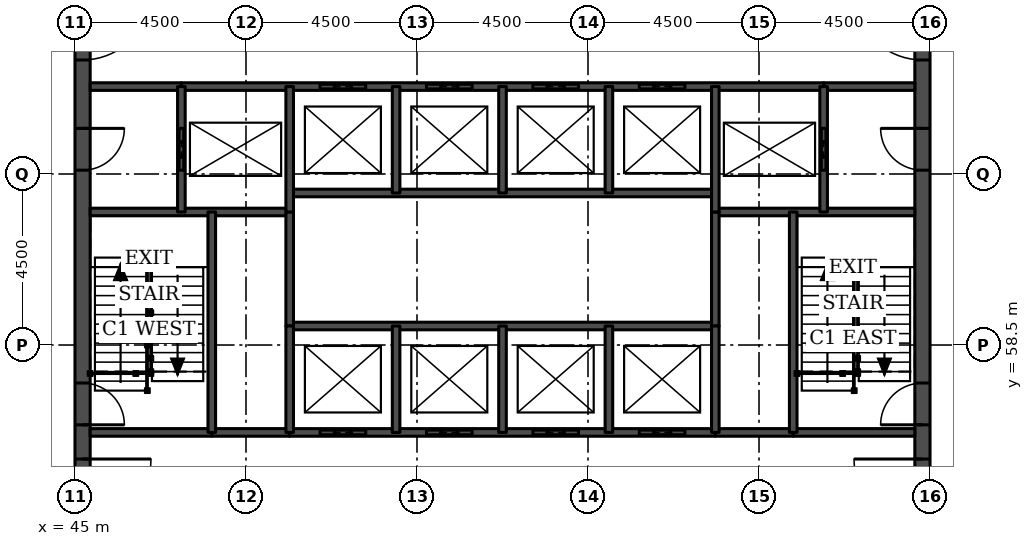
"""IFC4 building model, lengths in metres.
Left out: names, types, materials, properties, quantities, classifications, styles, units other than length and angle.
Written with IfcOpenShell. Run it as: python <this file> out.ifc"""

import sys

from ifc_helpers import new_model, si_unit, direction, frame, frame_2d, origin, place, context, subcontext, project, spatial, rectangle, extrude, element, fill, save


model = new_model("IFC4")
c1 = context("Model", 3, precision=1e-05, world=origin(), true_north=direction((0.0, 1.0)))
c2 = subcontext(c1, "Body", "Model", "MODEL_VIEW")
j1 = project(units=[si_unit("LENGTHUNIT", "METRE"), si_unit("PLANEANGLEUNIT", "RADIAN")], contexts=[c1])
p1 = place(None, origin())
s1 = spatial("IfcSite", under=j1, at=p1, CompositionType="ELEMENT")
p2 = place(p1, origin())
s2 = spatial("IfcBuilding", under=s1, at=p2, CompositionType="ELEMENT")
p3 = place(p2, frame((0.0, 0.0, 181.0)))
s3 = spatial("IfcBuildingStorey", under=s2, at=p3, CompositionType="ELEMENT", Elevation=181.0)
p4 = place(p3, frame((45.2, 49.5, 0.0), z_axis=(0.0, 0.0, 1.0), x_axis=(0.0, 1.0, 0.0)))
e1 = element("IfcWall", 1, at=p4, inside=s3, PredefinedType="SHEAR", context=c2, shape_type="SweptSolid", body=[
    extrude(rectangle(XDim=22.5, YDim=0.4, at=frame_2d((11.25, 0.0))), origin(), (0.0, 0.0, 1.0), 3.7),
])
p5 = place(p4, frame((4.2, 0.0, 0.0)))
e2 = element("IfcOpeningElement", 2, at=p5, cuts=e1, PredefinedType="OPENING", context=c2, shape_type="SweptSolid", body=[
    extrude(rectangle(XDim=1.8, YDim=2.1, at=frame_2d((0.9, 1.05))), frame((0.0, 0.21, 0.0), z_axis=(0.0, -1.0, 0.0), x_axis=(1.0, 0.0, 0.0)), (0.0, 0.0, 1.0), 0.42),
])
p6 = place(p4, frame((6.9, 0.0, 0.0)))
e3 = element("IfcOpeningElement", 3, at=p6, cuts=e1, PredefinedType="OPENING", context=c2, shape_type="SweptSolid", body=[
    extrude(rectangle(XDim=1.1, YDim=2.1, at=frame_2d((0.55, 1.05))), frame((0.0, 0.21, 0.0), z_axis=(0.0, -1.0, 0.0), x_axis=(1.0, 0.0, 0.0)), (0.0, 0.0, 1.0), 0.42),
])
p7 = place(p4, frame((13.6, 0.0, 0.0)))
e4 = element("IfcOpeningElement", 4, at=p7, cuts=e1, PredefinedType="OPENING", context=c2, shape_type="SweptSolid", body=[
    extrude(rectangle(XDim=1.1, YDim=2.1, at=frame_2d((0.55, 1.05))), frame((0.0, 0.21, 0.0), z_axis=(0.0, -1.0, 0.0), x_axis=(1.0, 0.0, 0.0)), (0.0, 0.0, 1.0), 0.42),
])
p8 = place(p4, frame((16.5, 0.0, 0.0)))
e5 = element("IfcOpeningElement", 5, at=p8, cuts=e1, PredefinedType="OPENING", context=c2, shape_type="SweptSolid", body=[
    extrude(rectangle(XDim=1.8, YDim=2.1, at=frame_2d((0.9, 1.05))), frame((0.0, 0.21, 0.0), z_axis=(0.0, -1.0, 0.0), x_axis=(1.0, 0.0, 0.0)), (0.0, 0.0, 1.0), 0.42),
])
p9 = place(p3, frame((67.3, 49.5, 0.0), z_axis=(0.0, 0.0, 1.0), x_axis=(0.0, 1.0, 0.0)))
e6 = element("IfcWall", 6, at=p9, inside=s3, PredefinedType="SHEAR", context=c2, shape_type="SweptSolid", body=[
    extrude(rectangle(XDim=22.5, YDim=0.4, at=frame_2d((11.25, 0.0))), origin(), (0.0, 0.0, 1.0), 3.7),
])
p10 = place(p9, frame((4.2, 0.0, 0.0)))
e7 = element("IfcOpeningElement", 7, at=p10, cuts=e6, PredefinedType="OPENING", context=c2, shape_type="SweptSolid", body=[
    extrude(rectangle(XDim=1.8, YDim=2.1, at=frame_2d((0.9, 1.05))), frame((0.0, 0.21, 0.0), z_axis=(0.0, -1.0, 0.0), x_axis=(1.0, 0.0, 0.0)), (0.0, 0.0, 1.0), 0.42),
])
p11 = place(p9, frame((6.9, 0.0, 0.0)))
e8 = element("IfcOpeningElement", 8, at=p11, cuts=e6, PredefinedType="OPENING", context=c2, shape_type="SweptSolid", body=[
    extrude(rectangle(XDim=1.1, YDim=2.1, at=frame_2d((0.55, 1.05))), frame((0.0, 0.21, 0.0), z_axis=(0.0, -1.0, 0.0), x_axis=(1.0, 0.0, 0.0)), (0.0, 0.0, 1.0), 0.42),
])
p12 = place(p9, frame((13.6, 0.0, 0.0)))
e9 = element("IfcOpeningElement", 9, at=p12, cuts=e6, PredefinedType="OPENING", context=c2, shape_type="SweptSolid", body=[
    extrude(rectangle(XDim=1.1, YDim=2.1, at=frame_2d((0.55, 1.05))), frame((0.0, 0.21, 0.0), z_axis=(0.0, -1.0, 0.0), x_axis=(1.0, 0.0, 0.0)), (0.0, 0.0, 1.0), 0.42),
])
p13 = place(p9, frame((16.5, 0.0, 0.0)))
e10 = element("IfcOpeningElement", 10, at=p13, cuts=e6, PredefinedType="OPENING", context=c2, shape_type="SweptSolid", body=[
    extrude(rectangle(XDim=1.8, YDim=2.1, at=frame_2d((0.9, 1.05))), frame((0.0, 0.21, 0.0), z_axis=(0.0, -1.0, 0.0), x_axis=(1.0, 0.0, 0.0)), (0.0, 0.0, 1.0), 0.42),
])
for number, where, z_axis, x_axis in (
    (11, (48.6, 56.2, 0.0), (0.0, 0.0, 1.0), (1.0, 0.0, 0.0)),
    (12, (61.85, 56.2, 0.0), (0.0, 0.0, 1.0), (1.0, 0.0, 0.0)),
):
    element("IfcWall", number, at=place(p3, frame(where, z_axis=z_axis, x_axis=x_axis)), inside=s3, PredefinedType="SOLIDWALL", context=c2, shape_type="SweptSolid", body=[
        extrude(rectangle(XDim=2.05, YDim=0.2, at=frame_2d((1.025, 0.0))), origin(), (0.0, 0.0, 1.0), 3.55),
    ])
p14 = place(p3, frame((45.4, 56.2, 0.0), z_axis=(0.0, 0.0, 1.0), x_axis=(1.0, 0.0, 0.0)))
e13 = element("IfcWall", 13, at=p14, inside=s3, PredefinedType="SOLIDWALL", context=c2, shape_type="SweptSolid", body=[
    extrude(rectangle(XDim=3.2, YDim=0.2, at=frame_2d((1.6, 0.0))), origin(), (0.0, 0.0, 1.0), 3.55),
])
p15 = place(p3, frame((50.65, 56.2, 0.0), z_axis=(0.0, 0.0, 1.0), x_axis=(1.0, 0.0, 0.0)))
e14 = element("IfcWall", 14, at=p15, inside=s3, PredefinedType="SOLIDWALL", context=c2, shape_type="SweptSolid", body=[
    extrude(rectangle(XDim=11.2, YDim=0.2, at=frame_2d((5.6, 0.0))), origin(), (0.0, 0.0, 1.0), 3.55),
])
p16 = place(p15, frame((0.8, 0.0, 0.0)))
e15 = element("IfcOpeningElement", 15, at=p16, cuts=e14, PredefinedType="OPENING", context=c2, shape_type="SweptSolid", body=[
    extrude(rectangle(XDim=1.2, YDim=2.1, at=frame_2d((0.6, 1.05))), frame((0.0, 0.11, 0.0), z_axis=(0.0, -1.0, 0.0), x_axis=(1.0, 0.0, 0.0)), (0.0, 0.0, 1.0), 0.22),
])
p17 = place(p15, frame((3.6, 0.0, 0.0)))
e16 = element("IfcOpeningElement", 16, at=p17, cuts=e14, PredefinedType="OPENING", context=c2, shape_type="SweptSolid", body=[
    extrude(rectangle(XDim=1.2, YDim=2.1, at=frame_2d((0.6, 1.05))), frame((0.0, 0.11, 0.0), z_axis=(0.0, -1.0, 0.0), x_axis=(1.0, 0.0, 0.0)), (0.0, 0.0, 1.0), 0.22),
])
p18 = place(p15, frame((6.4, 0.0, 0.0)))
e17 = element("IfcOpeningElement", 17, at=p18, cuts=e14, PredefinedType="OPENING", context=c2, shape_type="SweptSolid", body=[
    extrude(rectangle(XDim=1.2, YDim=2.1, at=frame_2d((0.6, 1.05))), frame((0.0, 0.11, 0.0), z_axis=(0.0, -1.0, 0.0), x_axis=(1.0, 0.0, 0.0)), (0.0, 0.0, 1.0), 0.22),
])
p19 = place(p15, frame((9.2, 0.0, 0.0)))
e18 = element("IfcOpeningElement", 18, at=p19, cuts=e14, PredefinedType="OPENING", context=c2, shape_type="SweptSolid", body=[
    extrude(rectangle(XDim=1.2, YDim=2.1, at=frame_2d((0.6, 1.05))), frame((0.0, 0.11, 0.0), z_axis=(0.0, -1.0, 0.0), x_axis=(1.0, 0.0, 0.0)), (0.0, 0.0, 1.0), 0.22),
])
p20 = place(p3, frame((63.9, 56.2, 0.0), z_axis=(0.0, 0.0, 1.0), x_axis=(1.0, 0.0, 0.0)))
e19 = element("IfcWall", 19, at=p20, inside=s3, PredefinedType="SOLIDWALL", context=c2, shape_type="SweptSolid", body=[
    extrude(rectangle(XDim=3.2, YDim=0.2, at=frame_2d((1.6, 0.0))), origin(), (0.0, 0.0, 1.0), 3.55),
])
p21 = place(p3, frame((50.65, 59.0, 0.0), z_axis=(0.0, 0.0, 1.0), x_axis=(1.0, 0.0, 0.0)))
e20 = element("IfcWall", 20, at=p21, inside=s3, PredefinedType="SOLIDWALL", context=c2, shape_type="SweptSolid", body=[
    extrude(rectangle(XDim=11.2, YDim=0.2, at=frame_2d((5.6, 0.0))), origin(), (0.0, 0.0, 1.0), 3.7),
])
for number, where, z_axis, x_axis in (
    (21, (45.4, 62.0, 0.0), (0.0, 0.0, 1.0), (1.0, 0.0, 0.0)),
    (22, (61.85, 62.0, 0.0), (0.0, 0.0, 1.0), (1.0, 0.0, 0.0)),
):
    element("IfcWall", number, at=place(p3, frame(where, z_axis=z_axis, x_axis=x_axis)), inside=s3, PredefinedType="SOLIDWALL", context=c2, shape_type="SweptSolid", body=[
        extrude(rectangle(XDim=5.25, YDim=0.2, at=frame_2d((2.625, 0.0))), origin(), (0.0, 0.0, 1.0), 3.55),
    ])
p22 = place(p3, frame((50.65, 62.5, 0.0), z_axis=(0.0, 0.0, 1.0), x_axis=(1.0, 0.0, 0.0)))
e23 = element("IfcWall", 23, at=p22, inside=s3, PredefinedType="SOLIDWALL", context=c2, shape_type="SweptSolid", body=[
    extrude(rectangle(XDim=11.2, YDim=0.2, at=frame_2d((5.6, 0.0))), origin(), (0.0, 0.0, 1.0), 3.7),
])
for number, where, z_axis, x_axis in (
    (24, (45.4, 65.3, 0.0), (0.0, 0.0, 1.0), (1.0, 0.0, 0.0)),
    (25, (64.7, 65.3, 0.0), (0.0, 0.0, 1.0), (1.0, 0.0, 0.0)),
):
    element("IfcWall", number, at=place(p3, frame(where, z_axis=z_axis, x_axis=x_axis)), inside=s3, PredefinedType="SOLIDWALL", context=c2, shape_type="SweptSolid", body=[
        extrude(rectangle(XDim=2.4, YDim=0.2, at=frame_2d((1.2, 0.0))), origin(), (0.0, 0.0, 1.0), 3.55),
    ])
p23 = place(p3, frame((47.8, 65.3, 0.0), z_axis=(0.0, 0.0, 1.0), x_axis=(1.0, 0.0, 0.0)))
e26 = element("IfcWall", 26, at=p23, inside=s3, PredefinedType="SOLIDWALL", context=c2, shape_type="SweptSolid", body=[
    extrude(rectangle(XDim=16.9, YDim=0.2, at=frame_2d((8.45, 0.0))), origin(), (0.0, 0.0, 1.0), 3.55),
])
p24 = place(p23, frame((3.65, 0.0, 0.0)))
e27 = element("IfcOpeningElement", 27, at=p24, cuts=e26, PredefinedType="OPENING", context=c2, shape_type="SweptSolid", body=[
    extrude(rectangle(XDim=1.2, YDim=2.1, at=frame_2d((0.6, 1.05))), frame((0.0, 0.11, 0.0), z_axis=(0.0, -1.0, 0.0), x_axis=(1.0, 0.0, 0.0)), (0.0, 0.0, 1.0), 0.22),
])
p25 = place(p23, frame((6.45, 0.0, 0.0)))
e28 = element("IfcOpeningElement", 28, at=p25, cuts=e26, PredefinedType="OPENING", context=c2, shape_type="SweptSolid", body=[
    extrude(rectangle(XDim=1.2, YDim=2.1, at=frame_2d((0.6, 1.05))), frame((0.0, 0.11, 0.0), z_axis=(0.0, -1.0, 0.0), x_axis=(1.0, 0.0, 0.0)), (0.0, 0.0, 1.0), 0.22),
])
p26 = place(p23, frame((9.25, 0.0, 0.0)))
e29 = element("IfcOpeningElement", 29, at=p26, cuts=e26, PredefinedType="OPENING", context=c2, shape_type="SweptSolid", body=[
    extrude(rectangle(XDim=1.2, YDim=2.1, at=frame_2d((0.6, 1.05))), frame((0.0, 0.11, 0.0), z_axis=(0.0, -1.0, 0.0), x_axis=(1.0, 0.0, 0.0)), (0.0, 0.0, 1.0), 0.22),
])
p27 = place(p23, frame((12.05, 0.0, 0.0)))
e30 = element("IfcOpeningElement", 30, at=p27, cuts=e26, PredefinedType="OPENING", context=c2, shape_type="SweptSolid", body=[
    extrude(rectangle(XDim=1.2, YDim=2.1, at=frame_2d((0.6, 1.05))), frame((0.0, 0.11, 0.0), z_axis=(0.0, -1.0, 0.0), x_axis=(1.0, 0.0, 0.0)), (0.0, 0.0, 1.0), 0.22),
])
p28 = place(p3, frame((47.8, 62.0, 0.0), z_axis=(0.0, 0.0, 1.0), x_axis=(0.0, 1.0, 0.0)))
e31 = element("IfcWall", 31, at=p28, inside=s3, PredefinedType="SOLIDWALL", context=c2, shape_type="SweptSolid", body=[
    extrude(rectangle(XDim=3.3, YDim=0.2, at=frame_2d((1.65, 0.0))), origin(), (0.0, 0.0, 1.0), 3.55),
])
p29 = place(p28, frame((1.1, 0.0, 0.0)))
e32 = element("IfcOpeningElement", 32, at=p29, cuts=e31, PredefinedType="OPENING", context=c2, shape_type="SweptSolid", body=[
    extrude(rectangle(XDim=1.1, YDim=2.1, at=frame_2d((0.55, 1.05))), frame((0.0, 0.11, 0.0), z_axis=(0.0, -1.0, 0.0), x_axis=(1.0, 0.0, 0.0)), (0.0, 0.0, 1.0), 0.22),
])
p30 = place(p3, frame((48.6, 56.2, 0.0), z_axis=(0.0, 0.0, 1.0), x_axis=(0.0, 1.0, 0.0)))
e33 = element("IfcWall", 33, at=p30, inside=s3, PredefinedType="SOLIDWALL", context=c2, shape_type="SweptSolid", body=[
    extrude(rectangle(XDim=5.8, YDim=0.2, at=frame_2d((2.9, 0.0))), origin(), (0.0, 0.0, 1.0), 3.55),
])
p31 = place(p3, frame((50.65, 59.0, 0.0), z_axis=(0.0, 0.0, 1.0), x_axis=(0.0, 1.0, 0.0)))
e34 = element("IfcWall", 34, at=p31, inside=s3, PredefinedType="SOLIDWALL", context=c2, shape_type="SweptSolid", body=[
    extrude(rectangle(XDim=3.0, YDim=0.2, at=frame_2d((1.5, 0.0))), origin(), (0.0, 0.0, 1.0), 3.7),
])
p32 = place(p3, frame((50.65, 56.2, 0.0), z_axis=(0.0, 0.0, 1.0), x_axis=(0.0, 1.0, 0.0)))
e35 = element("IfcWall", 35, at=p32, inside=s3, PredefinedType="SOLIDWALL", context=c2, shape_type="SweptSolid", body=[
    extrude(rectangle(XDim=2.8, YDim=0.2, at=frame_2d((1.4, 0.0))), origin(), (0.0, 0.0, 1.0), 3.55),
])
p33 = place(p3, frame((50.65, 62.0, 0.0), z_axis=(0.0, 0.0, 1.0), x_axis=(0.0, 1.0, 0.0)))
e36 = element("IfcWall", 36, at=p33, inside=s3, PredefinedType="SOLIDWALL", context=c2, shape_type="SweptSolid", body=[
    extrude(rectangle(XDim=3.3, YDim=0.2, at=frame_2d((1.65, 0.0))), origin(), (0.0, 0.0, 1.0), 3.55),
])
for number, where, z_axis, x_axis in (
    (37, (53.45, 56.2, 0.0), (0.0, 0.0, 1.0), (0.0, 1.0, 0.0)),
    (38, (53.45, 62.5, 0.0), (0.0, 0.0, 1.0), (0.0, 1.0, 0.0)),
    (39, (56.25, 56.2, 0.0), (0.0, 0.0, 1.0), (0.0, 1.0, 0.0)),
    (40, (56.25, 62.5, 0.0), (0.0, 0.0, 1.0), (0.0, 1.0, 0.0)),
    (41, (59.05, 56.2, 0.0), (0.0, 0.0, 1.0), (0.0, 1.0, 0.0)),
    (42, (59.05, 62.5, 0.0), (0.0, 0.0, 1.0), (0.0, 1.0, 0.0)),
):
    element("IfcWall", number, at=place(p3, frame(where, z_axis=z_axis, x_axis=x_axis)), inside=s3, PredefinedType="SOLIDWALL", context=c2, shape_type="SweptSolid", body=[
        extrude(rectangle(XDim=2.8, YDim=0.2, at=frame_2d((1.4, 0.0))), origin(), (0.0, 0.0, 1.0), 3.55),
    ])
p34 = place(p3, frame((61.85, 59.0, 0.0), z_axis=(0.0, 0.0, 1.0), x_axis=(0.0, 1.0, 0.0)))
e43 = element("IfcWall", 43, at=p34, inside=s3, PredefinedType="SOLIDWALL", context=c2, shape_type="SweptSolid", body=[
    extrude(rectangle(XDim=3.0, YDim=0.2, at=frame_2d((1.5, 0.0))), origin(), (0.0, 0.0, 1.0), 3.7),
])
p35 = place(p3, frame((61.85, 56.2, 0.0), z_axis=(0.0, 0.0, 1.0), x_axis=(0.0, 1.0, 0.0)))
e44 = element("IfcWall", 44, at=p35, inside=s3, PredefinedType="SOLIDWALL", context=c2, shape_type="SweptSolid", body=[
    extrude(rectangle(XDim=2.8, YDim=0.2, at=frame_2d((1.4, 0.0))), origin(), (0.0, 0.0, 1.0), 3.55),
])
p36 = place(p3, frame((61.85, 62.0, 0.0), z_axis=(0.0, 0.0, 1.0), x_axis=(0.0, 1.0, 0.0)))
e45 = element("IfcWall", 45, at=p36, inside=s3, PredefinedType="SOLIDWALL", context=c2, shape_type="SweptSolid", body=[
    extrude(rectangle(XDim=3.3, YDim=0.2, at=frame_2d((1.65, 0.0))), origin(), (0.0, 0.0, 1.0), 3.55),
])
p37 = place(p3, frame((63.9, 56.2, 0.0), z_axis=(0.0, 0.0, 1.0), x_axis=(0.0, 1.0, 0.0)))
e46 = element("IfcWall", 46, at=p37, inside=s3, PredefinedType="SOLIDWALL", context=c2, shape_type="SweptSolid", body=[
    extrude(rectangle(XDim=5.8, YDim=0.2, at=frame_2d((2.9, 0.0))), origin(), (0.0, 0.0, 1.0), 3.55),
])
p38 = place(p3, frame((64.7, 62.0, 0.0), z_axis=(0.0, 0.0, 1.0), x_axis=(0.0, 1.0, 0.0)))
e47 = element("IfcWall", 47, at=p38, inside=s3, PredefinedType="SOLIDWALL", context=c2, shape_type="SweptSolid", body=[
    extrude(rectangle(XDim=3.3, YDim=0.2, at=frame_2d((1.65, 0.0))), origin(), (0.0, 0.0, 1.0), 3.55),
])
p39 = place(p38, frame((1.1, 0.0, 0.0)))
e48 = element("IfcOpeningElement", 48, at=p39, cuts=e47, PredefinedType="OPENING", context=c2, shape_type="SweptSolid", body=[
    extrude(rectangle(XDim=1.1, YDim=2.1, at=frame_2d((0.55, 1.05))), frame((0.0, 0.11, 0.0), z_axis=(0.0, -1.0, 0.0), x_axis=(1.0, 0.0, 0.0)), (0.0, 0.0, 1.0), 0.22),
])
p40 = place(p16, origin())
e49 = element("IfcDoor", 49, at=p40, inside=s3, OperationType="DOUBLE_DOOR_SLIDING", PredefinedType="DOOR", context=c2, shape_type="SweptSolid", body=[
    extrude(rectangle(XDim=1.2, YDim=2.1, at=frame_2d((0.6, 1.05))), frame((0.0, 0.025, 0.0), z_axis=(0.0, -1.0, 0.0), x_axis=(1.0, 0.0, 0.0)), (0.0, 0.0, 1.0), 0.05),
])
fill(e15, e49)
p41 = place(p17, origin())
e50 = element("IfcDoor", 50, at=p41, inside=s3, OperationType="DOUBLE_DOOR_SLIDING", PredefinedType="DOOR", context=c2, shape_type="SweptSolid", body=[
    extrude(rectangle(XDim=1.2, YDim=2.1, at=frame_2d((0.6, 1.05))), frame((0.0, 0.025, 0.0), z_axis=(0.0, -1.0, 0.0), x_axis=(1.0, 0.0, 0.0)), (0.0, 0.0, 1.0), 0.05),
])
fill(e16, e50)
p42 = place(p18, origin())
e51 = element("IfcDoor", 51, at=p42, inside=s3, OperationType="DOUBLE_DOOR_SLIDING", PredefinedType="DOOR", context=c2, shape_type="SweptSolid", body=[
    extrude(rectangle(XDim=1.2, YDim=2.1, at=frame_2d((0.6, 1.05))), frame((0.0, 0.025, 0.0), z_axis=(0.0, -1.0, 0.0), x_axis=(1.0, 0.0, 0.0)), (0.0, 0.0, 1.0), 0.05),
])
fill(e17, e51)
p43 = place(p19, origin())
e52 = element("IfcDoor", 52, at=p43, inside=s3, OperationType="DOUBLE_DOOR_SLIDING", PredefinedType="DOOR", context=c2, shape_type="SweptSolid", body=[
    extrude(rectangle(XDim=1.2, YDim=2.1, at=frame_2d((0.6, 1.05))), frame((0.0, 0.025, 0.0), z_axis=(0.0, -1.0, 0.0), x_axis=(1.0, 0.0, 0.0)), (0.0, 0.0, 1.0), 0.05),
])
fill(e18, e52)
p44 = place(p24, origin())
e53 = element("IfcDoor", 53, at=p44, inside=s3, OperationType="DOUBLE_DOOR_SLIDING", PredefinedType="DOOR", context=c2, shape_type="SweptSolid", body=[
    extrude(rectangle(XDim=1.2, YDim=2.1, at=frame_2d((0.6, 1.05))), frame((0.0, 0.025, 0.0), z_axis=(0.0, -1.0, 0.0), x_axis=(1.0, 0.0, 0.0)), (0.0, 0.0, 1.0), 0.05),
])
fill(e27, e53)
p45 = place(p25, origin())
e54 = element("IfcDoor", 54, at=p45, inside=s3, OperationType="DOUBLE_DOOR_SLIDING", PredefinedType="DOOR", context=c2, shape_type="SweptSolid", body=[
    extrude(rectangle(XDim=1.2, YDim=2.1, at=frame_2d((0.6, 1.05))), frame((0.0, 0.025, 0.0), z_axis=(0.0, -1.0, 0.0), x_axis=(1.0, 0.0, 0.0)), (0.0, 0.0, 1.0), 0.05),
])
fill(e28, e54)
p46 = place(p26, origin())
e55 = element("IfcDoor", 55, at=p46, inside=s3, OperationType="DOUBLE_DOOR_SLIDING", PredefinedType="DOOR", context=c2, shape_type="SweptSolid", body=[
    extrude(rectangle(XDim=1.2, YDim=2.1, at=frame_2d((0.6, 1.05))), frame((0.0, 0.025, 0.0), z_axis=(0.0, -1.0, 0.0), x_axis=(1.0, 0.0, 0.0)), (0.0, 0.0, 1.0), 0.05),
])
fill(e29, e55)
p47 = place(p27, origin())
e56 = element("IfcDoor", 56, at=p47, inside=s3, OperationType="DOUBLE_DOOR_SLIDING", PredefinedType="DOOR", context=c2, shape_type="SweptSolid", body=[
    extrude(rectangle(XDim=1.2, YDim=2.1, at=frame_2d((0.6, 1.05))), frame((0.0, 0.025, 0.0), z_axis=(0.0, -1.0, 0.0), x_axis=(1.0, 0.0, 0.0)), (0.0, 0.0, 1.0), 0.05),
])
fill(e30, e56)
p48 = place(p29, origin())
e57 = element("IfcDoor", 57, at=p48, inside=s3, OperationType="DOUBLE_DOOR_SLIDING", PredefinedType="DOOR", context=c2, shape_type="SweptSolid", body=[
    extrude(rectangle(XDim=1.1, YDim=2.1, at=frame_2d((0.55, 1.05))), frame((0.0, 0.025, 0.0), z_axis=(0.0, -1.0, 0.0), x_axis=(1.0, 0.0, 0.0)), (0.0, 0.0, 1.0), 0.05),
])
fill(e32, e57)
p49 = place(p39, origin())
e58 = element("IfcDoor", 58, at=p49, inside=s3, OperationType="DOUBLE_DOOR_SLIDING", PredefinedType="DOOR", context=c2, shape_type="SweptSolid", body=[
    extrude(rectangle(XDim=1.1, YDim=2.1, at=frame_2d((0.55, 1.05))), frame((0.0, 0.025, 0.0), z_axis=(0.0, -1.0, 0.0), x_axis=(1.0, 0.0, 0.0)), (0.0, 0.0, 1.0), 0.05),
])
fill(e48, e58)
p50 = place(p5, frame((1.8, 0.0, 0.0), z_axis=(0.0, 0.0, 1.0), x_axis=(-1.0, 0.0, 0.0)))
e59 = element("IfcDoor", 59, at=p50, inside=s3, OperationType="SINGLE_SWING_LEFT", PredefinedType="DOOR", context=c2, shape_type="SweptSolid", body=[
    extrude(rectangle(XDim=1.8, YDim=2.1, at=frame_2d((0.9, 1.05))), frame((0.0, 0.025, 0.0), z_axis=(0.0, -1.0, 0.0), x_axis=(1.0, 0.0, 0.0)), (0.0, 0.0, 1.0), 0.05),
])
fill(e2, e59)
p51 = place(p6, frame((1.1, 0.0, 0.0), z_axis=(0.0, 0.0, 1.0), x_axis=(-1.0, 0.0, 0.0)))
e60 = element("IfcDoor", 60, at=p51, inside=s3, OperationType="SINGLE_SWING_RIGHT", PredefinedType="DOOR", context=c2, shape_type="SweptSolid", body=[
    extrude(rectangle(XDim=1.1, YDim=2.1, at=frame_2d((0.55, 1.05))), frame((0.0, 0.025, 0.0), z_axis=(0.0, -1.0, 0.0), x_axis=(1.0, 0.0, 0.0)), (0.0, 0.0, 1.0), 0.05),
])
fill(e3, e60)
p52 = place(p7, frame((1.1, 0.0, 0.0), z_axis=(0.0, 0.0, 1.0), x_axis=(-1.0, 0.0, 0.0)))
e61 = element("IfcDoor", 61, at=p52, inside=s3, OperationType="SINGLE_SWING_LEFT", PredefinedType="DOOR", context=c2, shape_type="SweptSolid", body=[
    extrude(rectangle(XDim=1.1, YDim=2.1, at=frame_2d((0.55, 1.05))), frame((0.0, 0.025, 0.0), z_axis=(0.0, -1.0, 0.0), x_axis=(1.0, 0.0, 0.0)), (0.0, 0.0, 1.0), 0.05),
])
fill(e4, e61)
p53 = place(p8, frame((1.8, 0.0, 0.0), z_axis=(0.0, 0.0, 1.0), x_axis=(-1.0, 0.0, 0.0)))
e62 = element("IfcDoor", 62, at=p53, inside=s3, OperationType="SINGLE_SWING_LEFT", PredefinedType="DOOR", context=c2, shape_type="SweptSolid", body=[
    extrude(rectangle(XDim=1.8, YDim=2.1, at=frame_2d((0.9, 1.05))), frame((0.0, 0.025, 0.0), z_axis=(0.0, -1.0, 0.0), x_axis=(1.0, 0.0, 0.0)), (0.0, 0.0, 1.0), 0.05),
])
fill(e5, e62)
p54 = place(p10, origin())
e63 = element("IfcDoor", 63, at=p54, inside=s3, OperationType="SINGLE_SWING_RIGHT", PredefinedType="DOOR", context=c2, shape_type="SweptSolid", body=[
    extrude(rectangle(XDim=1.8, YDim=2.1, at=frame_2d((0.9, 1.05))), frame((0.0, 0.025, 0.0), z_axis=(0.0, -1.0, 0.0), x_axis=(1.0, 0.0, 0.0)), (0.0, 0.0, 1.0), 0.05),
])
fill(e7, e63)
p55 = place(p11, origin())
e64 = element("IfcDoor", 64, at=p55, inside=s3, OperationType="SINGLE_SWING_LEFT", PredefinedType="DOOR", context=c2, shape_type="SweptSolid", body=[
    extrude(rectangle(XDim=1.1, YDim=2.1, at=frame_2d((0.55, 1.05))), frame((0.0, 0.025, 0.0), z_axis=(0.0, -1.0, 0.0), x_axis=(1.0, 0.0, 0.0)), (0.0, 0.0, 1.0), 0.05),
])
fill(e8, e64)
p56 = place(p12, origin())
e65 = element("IfcDoor", 65, at=p56, inside=s3, OperationType="SINGLE_SWING_RIGHT", PredefinedType="DOOR", context=c2, shape_type="SweptSolid", body=[
    extrude(rectangle(XDim=1.1, YDim=2.1, at=frame_2d((0.55, 1.05))), frame((0.0, 0.025, 0.0), z_axis=(0.0, -1.0, 0.0), x_axis=(1.0, 0.0, 0.0)), (0.0, 0.0, 1.0), 0.05),
])
fill(e9, e65)
p57 = place(p13, origin())
e66 = element("IfcDoor", 66, at=p57, inside=s3, OperationType="SINGLE_SWING_RIGHT", PredefinedType="DOOR", context=c2, shape_type="SweptSolid", body=[
    extrude(rectangle(XDim=1.8, YDim=2.1, at=frame_2d((0.9, 1.05))), frame((0.0, 0.025, 0.0), z_axis=(0.0, -1.0, 0.0), x_axis=(1.0, 0.0, 0.0)), (0.0, 0.0, 1.0), 0.05),
])
fill(e10, e66)
save(model, sys.argv[1])
